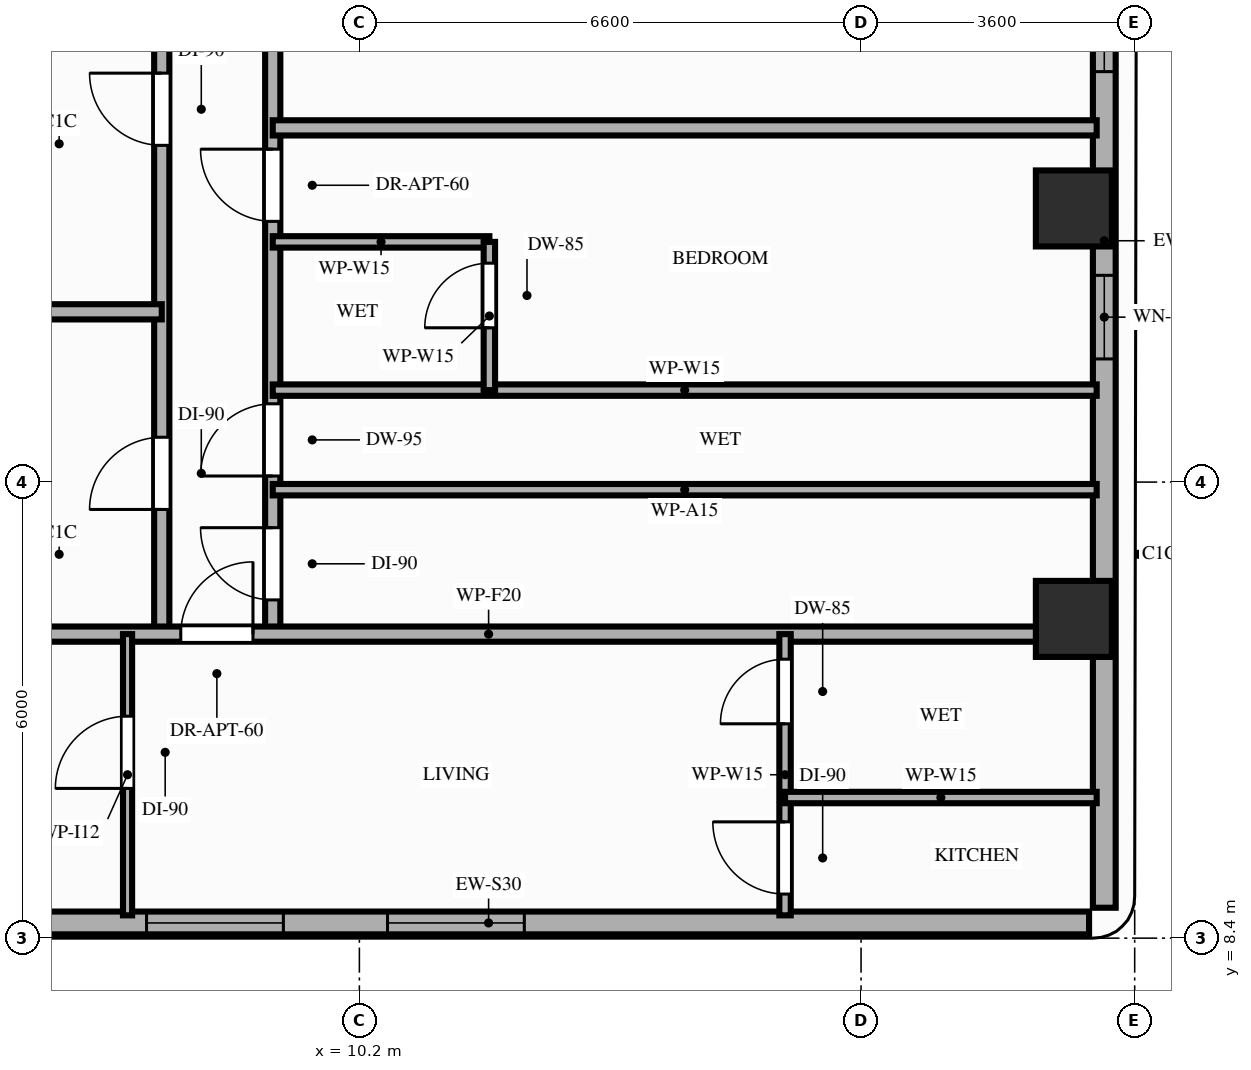
"""IFC4 building model, lengths in metres.
Left out: names, types, materials, properties, quantities, classifications, styles, units other than length and angle.
Written with IfcOpenShell. Run it as: python <this file> out.ifc"""

import sys

from ifc_helpers import new_model, si_unit, direction, frame, frame_2d, origin, origin_2d, place, context, subcontext, project, spatial, rectangle, extrude, element, fill, save


model = new_model("IFC4")
c1 = context("Model", 3, precision=1e-05, world=origin(), true_north=direction((0.0, 1.0)))
c2 = subcontext(c1, "Body", "Model", "MODEL_VIEW")
j1 = project(units=[si_unit("LENGTHUNIT", "METRE"), si_unit("PLANEANGLEUNIT", "RADIAN")], contexts=[c1])
p1 = place(None, origin())
s1 = spatial("IfcSite", under=j1, at=p1, CompositionType="ELEMENT")
p2 = place(p1, origin())
s2 = spatial("IfcBuilding", under=s1, at=p2, CompositionType="ELEMENT")
p3 = place(p2, frame((0.0, 0.0, 126.6)))
s3 = spatial("IfcBuildingStorey", under=s2, at=p3, CompositionType="ELEMENT", Elevation=126.6)
for number, where, z_axis, x_axis in (
    (1, (19.6, 12.6, 0.0), (0.0, 0.0, 1.0), (1.0, 0.0, 0.0)),
    (2, (19.6, 18.0, 0.0), (0.0, 0.0, 1.0), (1.0, 0.0, 0.0)),
):
    element("IfcColumn", number, at=place(p3, frame(where, z_axis=z_axis, x_axis=x_axis)), inside=s3, PredefinedType="COLUMN", context=c2, shape_type="SweptSolid", body=[
        extrude(rectangle(XDim=1.0, YDim=1.0, at=origin_2d()), origin(), (0.0, 0.0, 1.0), 3.2),
    ])
p4 = place(p3, frame((4.0, 8.6, 0.0), z_axis=(0.0, 0.0, 1.0), x_axis=(1.0, 0.0, 0.0)))
e3 = element("IfcWall", 3, at=p4, inside=s3, PredefinedType="STANDARD", context=c2, shape_type="SweptSolid", body=[
    extrude(rectangle(XDim=15.8, YDim=0.3, at=frame_2d((7.9, 0.0))), origin(), (0.0, 0.0, 1.0), 3.02),
])
p5 = place(p4, frame((6.57, 0.0, 0.85)))
e4 = element("IfcOpeningElement", 4, at=p5, cuts=e3, PredefinedType="OPENING", context=c2, shape_type="SweptSolid", body=[
    extrude(rectangle(XDim=1.8, YDim=1.75, at=frame_2d((0.9, 0.875))), frame((0.0, 0.16, 0.0), z_axis=(0.0, -1.0, 0.0), x_axis=(1.0, 0.0, 0.0)), (0.0, 0.0, 1.0), 0.32),
])
p6 = place(p4, frame((3.4, 0.0, 0.85)))
e5 = element("IfcOpeningElement", 5, at=p6, cuts=e3, PredefinedType="OPENING", context=c2, shape_type="SweptSolid", body=[
    extrude(rectangle(XDim=1.8, YDim=1.75, at=frame_2d((0.9, 0.875))), frame((0.0, 0.16, 0.0), z_axis=(0.0, -1.0, 0.0), x_axis=(1.0, 0.0, 0.0)), (0.0, 0.0, 1.0), 0.32),
])
p7 = place(p3, frame((20.0, 8.8, 0.0), z_axis=(0.0, 0.0, 1.0), x_axis=(0.0, 1.0, 0.0)))
e6 = element("IfcWall", 6, at=p7, inside=s3, PredefinedType="STANDARD", context=c2, shape_type="SweptSolid", body=[
    extrude(rectangle(XDim=17.55, YDim=0.3, at=frame_2d((8.775, 0.0))), origin(), (0.0, 0.0, 1.0), 2.45),
])
p8 = place(p7, frame((7.22, 0.0, 0.85)))
e7 = element("IfcOpeningElement", 7, at=p8, cuts=e6, PredefinedType="OPENING", context=c2, shape_type="SweptSolid", body=[
    extrude(rectangle(XDim=1.1, YDim=1.35, at=frame_2d((0.55, 0.675))), frame((0.0, 0.16, 0.0), z_axis=(0.0, -1.0, 0.0), x_axis=(1.0, 0.0, 0.0)), (0.0, 0.0, 1.0), 0.32),
])
p9 = place(p7, frame((11.0, 0.0, 0.85)))
e8 = element("IfcOpeningElement", 8, at=p9, cuts=e6, PredefinedType="OPENING", context=c2, shape_type="SweptSolid", body=[
    extrude(rectangle(XDim=1.8, YDim=1.35, at=frame_2d((0.9, 0.675))), frame((0.0, 0.16, 0.0), z_axis=(0.0, -1.0, 0.0), x_axis=(1.0, 0.0, 0.0)), (0.0, 0.0, 1.0), 0.32),
])
p10 = place(p3, frame((7.6, 12.4, 0.0), z_axis=(0.0, 0.0, 1.0), x_axis=(0.0, 1.0, 0.0)))
e9 = element("IfcWall", 9, at=p10, inside=s3, PredefinedType="PARTITIONING", context=c2, shape_type="SweptSolid", body=[
    extrude(rectangle(XDim=15.7, YDim=0.2, at=frame_2d((7.85, 0.0))), origin(), (0.0, 0.0, 1.0), 2.45),
])
p11 = place(p10, frame((1.64, 0.0, 0.0)))
e10 = element("IfcOpeningElement", 10, at=p11, cuts=e9, PredefinedType="OPENING", context=c2, shape_type="SweptSolid", body=[
    extrude(rectangle(XDim=0.95, YDim=2.15, at=frame_2d((0.475, 1.075))), frame((0.0, 0.11, 0.0), z_axis=(0.0, -1.0, 0.0), x_axis=(1.0, 0.0, 0.0)), (0.0, 0.0, 1.0), 0.22),
])
p12 = place(p10, frame((6.43, 0.0, 0.0)))
e11 = element("IfcOpeningElement", 11, at=p12, cuts=e9, PredefinedType="OPENING", context=c2, shape_type="SweptSolid", body=[
    extrude(rectangle(XDim=0.95, YDim=2.15, at=frame_2d((0.475, 1.075))), frame((0.0, 0.11, 0.0), z_axis=(0.0, -1.0, 0.0), x_axis=(1.0, 0.0, 0.0)), (0.0, 0.0, 1.0), 0.22),
])
p13 = place(p10, frame((12.16, 0.0, 0.0)))
e12 = element("IfcOpeningElement", 12, at=p13, cuts=e9, PredefinedType="OPENING", context=c2, shape_type="SweptSolid", body=[
    extrude(rectangle(XDim=0.95, YDim=2.15, at=frame_2d((0.475, 1.075))), frame((0.0, 0.11, 0.0), z_axis=(0.0, -1.0, 0.0), x_axis=(1.0, 0.0, 0.0)), (0.0, 0.0, 1.0), 0.22),
])
p14 = place(p3, frame((9.06, 12.4, 0.0), z_axis=(0.0, 0.0, 1.0), x_axis=(0.0, 1.0, 0.0)))
e13 = element("IfcWall", 13, at=p14, inside=s3, PredefinedType="PARTITIONING", context=c2, shape_type="SweptSolid", body=[
    extrude(rectangle(XDim=15.7, YDim=0.2, at=frame_2d((7.85, 0.0))), origin(), (0.0, 0.0, 1.0), 2.45),
])
p15 = place(p14, frame((0.45, 0.0, 0.0)))
e14 = element("IfcOpeningElement", 14, at=p15, cuts=e13, PredefinedType="OPENING", context=c2, shape_type="SweptSolid", body=[
    extrude(rectangle(XDim=0.95, YDim=2.15, at=frame_2d((0.475, 1.075))), frame((0.0, 0.11, 0.0), z_axis=(0.0, -1.0, 0.0), x_axis=(1.0, 0.0, 0.0)), (0.0, 0.0, 1.0), 0.22),
])
p16 = place(p14, frame((2.08, 0.0, 0.0)))
e15 = element("IfcOpeningElement", 15, at=p16, cuts=e13, PredefinedType="OPENING", context=c2, shape_type="SweptSolid", body=[
    extrude(rectangle(XDim=0.95, YDim=2.1, at=frame_2d((0.475, 1.05))), frame((0.0, 0.11, 0.0), z_axis=(0.0, -1.0, 0.0), x_axis=(1.0, 0.0, 0.0)), (0.0, 0.0, 1.0), 0.22),
])
p17 = place(p14, frame((10.7, 0.0, 0.0)))
e16 = element("IfcOpeningElement", 16, at=p17, cuts=e13, PredefinedType="OPENING", context=c2, shape_type="SweptSolid", body=[
    extrude(rectangle(XDim=0.95, YDim=2.15, at=frame_2d((0.475, 1.075))), frame((0.0, 0.11, 0.0), z_axis=(0.0, -1.0, 0.0), x_axis=(1.0, 0.0, 0.0)), (0.0, 0.0, 1.0), 0.22),
])
p18 = place(p14, frame((5.43, 0.0, 0.0)))
e17 = element("IfcOpeningElement", 17, at=p18, cuts=e13, PredefinedType="OPENING", context=c2, shape_type="SweptSolid", body=[
    extrude(rectangle(XDim=0.95, YDim=2.15, at=frame_2d((0.475, 1.075))), frame((0.0, 0.11, 0.0), z_axis=(0.0, -1.0, 0.0), x_axis=(1.0, 0.0, 0.0)), (0.0, 0.0, 1.0), 0.22),
])
p19 = place(p3, frame((3.9, 12.4, 0.0), z_axis=(0.0, 0.0, 1.0), x_axis=(1.0, 0.0, 0.0)))
e18 = element("IfcWall", 18, at=p19, inside=s3, PredefinedType="PARTITIONING", context=c2, shape_type="SweptSolid", body=[
    extrude(rectangle(XDim=16.0, YDim=0.2, at=frame_2d((8.0, 0.0))), origin(), (0.0, 0.0, 1.0), 2.45),
])
p20 = place(p19, frame((3.95, 0.0, 0.0)))
e19 = element("IfcOpeningElement", 19, at=p20, cuts=e18, PredefinedType="OPENING", context=c2, shape_type="SweptSolid", body=[
    extrude(rectangle(XDim=0.95, YDim=2.15, at=frame_2d((0.475, 1.075))), frame((0.0, 0.11, 0.0), z_axis=(0.0, -1.0, 0.0), x_axis=(1.0, 0.0, 0.0)), (0.0, 0.0, 1.0), 0.22),
])
p21 = place(p3, frame((3.9, 16.64, 0.0), z_axis=(0.0, 0.0, 1.0), x_axis=(1.0, 0.0, 0.0)))
e20 = element("IfcWall", 20, at=p21, inside=s3, PredefinedType="PARTITIONING", context=c2, shape_type="SweptSolid", body=[
    extrude(rectangle(XDim=3.7, YDim=0.2, at=frame_2d((1.85, 0.0))), origin(), (0.0, 0.0, 1.0), 2.45),
])
p22 = place(p3, frame((7.15, 8.7, 0.0), z_axis=(0.0, 0.0, 1.0), x_axis=(0.0, 1.0, 0.0)))
e21 = element("IfcWall", 21, at=p22, inside=s3, PredefinedType="PARTITIONING", context=c2, shape_type="SweptSolid", body=[
    extrude(rectangle(XDim=3.7, YDim=0.12, at=frame_2d((1.85, 0.0))), origin(), (0.0, 0.0, 1.0), 2.45),
])
p23 = place(p22, frame((1.67, 0.0, 0.0)))
e22 = element("IfcOpeningElement", 22, at=p23, cuts=e21, PredefinedType="OPENING", context=c2, shape_type="SweptSolid", body=[
    extrude(rectangle(XDim=0.95, YDim=2.15, at=frame_2d((0.475, 1.075))), frame((0.0, 0.07, 0.0), z_axis=(0.0, -1.0, 0.0), x_axis=(1.0, 0.0, 0.0)), (0.0, 0.0, 1.0), 0.14),
])
p24 = place(p3, frame((15.8, 8.7, 0.0), z_axis=(0.0, 0.0, 1.0), x_axis=(0.0, 1.0, 0.0)))
e23 = element("IfcWall", 23, at=p24, inside=s3, PredefinedType="PARTITIONING", context=c2, shape_type="SweptSolid", body=[
    extrude(rectangle(XDim=3.7, YDim=0.15, at=frame_2d((1.85, 0.0))), origin(), (0.0, 0.0, 1.0), 2.45),
])
p25 = place(p24, frame((0.28, 0.0, 0.0)))
e24 = element("IfcOpeningElement", 24, at=p25, cuts=e23, PredefinedType="OPENING", context=c2, shape_type="SweptSolid", body=[
    extrude(rectangle(XDim=0.95, YDim=2.15, at=frame_2d((0.475, 1.075))), frame((0.0, 0.085, 0.0), z_axis=(0.0, -1.0, 0.0), x_axis=(1.0, 0.0, 0.0)), (0.0, 0.0, 1.0), 0.17),
])
p26 = place(p24, frame((2.52, 0.0, 0.0)))
e25 = element("IfcOpeningElement", 25, at=p26, cuts=e23, PredefinedType="OPENING", context=c2, shape_type="SweptSolid", body=[
    extrude(rectangle(XDim=0.85, YDim=2.1, at=frame_2d((0.425, 1.05))), frame((0.0, 0.085, 0.0), z_axis=(0.0, -1.0, 0.0), x_axis=(1.0, 0.0, 0.0)), (0.0, 0.0, 1.0), 0.17),
])
p27 = place(p3, frame((15.8, 10.25, 0.0), z_axis=(0.0, 0.0, 1.0), x_axis=(1.0, 0.0, 0.0)))
e26 = element("IfcWall", 26, at=p27, inside=s3, PredefinedType="PARTITIONING", context=c2, shape_type="SweptSolid", body=[
    extrude(rectangle(XDim=4.1, YDim=0.15, at=frame_2d((2.05, 0.0))), origin(), (0.0, 0.0, 1.0), 3.02),
])
for number, where, z_axis, x_axis in (
    (27, (9.06, 14.3, 0.0), (0.0, 0.0, 1.0), (1.0, 0.0, 0.0)),
    (28, (9.06, 15.61, 0.0), (0.0, 0.0, 1.0), (1.0, 0.0, 0.0)),
):
    element("IfcWall", number, at=place(p3, frame(where, z_axis=z_axis, x_axis=x_axis)), inside=s3, PredefinedType="PARTITIONING", context=c2, shape_type="SweptSolid", body=[
        extrude(rectangle(XDim=10.84, YDim=0.15, at=frame_2d((5.42, 0.0))), origin(), (0.0, 0.0, 1.0), 2.45),
    ])
p28 = place(p3, frame((9.06, 19.06, 0.0), z_axis=(0.0, 0.0, 1.0), x_axis=(1.0, 0.0, 0.0)))
e29 = element("IfcWall", 29, at=p28, inside=s3, PredefinedType="PARTITIONING", context=c2, shape_type="SweptSolid", body=[
    extrude(rectangle(XDim=10.84, YDim=0.2, at=frame_2d((5.42, 0.0))), origin(), (0.0, 0.0, 1.0), 2.45),
])
p29 = place(p3, frame((9.06, 17.56, 0.0), z_axis=(0.0, 0.0, 1.0), x_axis=(1.0, 0.0, 0.0)))
e30 = element("IfcWall", 30, at=p29, inside=s3, PredefinedType="PARTITIONING", context=c2, shape_type="SweptSolid", body=[
    extrude(rectangle(XDim=2.85, YDim=0.15, at=frame_2d((1.425, 0.0))), origin(), (0.0, 0.0, 1.0), 3.02),
])
p30 = place(p3, frame((11.91, 15.61, 0.0), z_axis=(0.0, 0.0, 1.0), x_axis=(0.0, 1.0, 0.0)))
e31 = element("IfcWall", 31, at=p30, inside=s3, PredefinedType="PARTITIONING", context=c2, shape_type="SweptSolid", body=[
    extrude(rectangle(XDim=1.95, YDim=0.15, at=frame_2d((0.975, 0.0))), origin(), (0.0, 0.0, 1.0), 2.71),
])
p31 = place(p30, frame((0.82, 0.0, 0.0)))
e32 = element("IfcOpeningElement", 32, at=p31, cuts=e31, PredefinedType="OPENING", context=c2, shape_type="SweptSolid", body=[
    extrude(rectangle(XDim=0.85, YDim=2.1, at=frame_2d((0.425, 1.05))), frame((0.0, 0.085, 0.0), z_axis=(0.0, -1.0, 0.0), x_axis=(1.0, 0.0, 0.0)), (0.0, 0.0, 1.0), 0.17),
])
p32 = place(p5, origin())
e33 = element("IfcWindow", 33, at=p32, inside=s3, PartitioningType="SINGLE_PANEL", PredefinedType="WINDOW", context=c2, shape_type="SweptSolid", body=[
    extrude(rectangle(XDim=1.8, YDim=1.75, at=frame_2d((0.9, 0.875))), frame((0.0, 0.03, 0.0), z_axis=(0.0, -1.0, 0.0), x_axis=(1.0, 0.0, 0.0)), (0.0, 0.0, 1.0), 0.06),
])
fill(e4, e33)
p33 = place(p8, origin())
e34 = element("IfcWindow", 34, at=p33, inside=s3, PartitioningType="SINGLE_PANEL", PredefinedType="WINDOW", context=c2, shape_type="SweptSolid", body=[
    extrude(rectangle(XDim=1.1, YDim=1.35, at=frame_2d((0.55, 0.675))), frame((0.0, 0.03, 0.0), z_axis=(0.0, -1.0, 0.0), x_axis=(1.0, 0.0, 0.0)), (0.0, 0.0, 1.0), 0.06),
])
fill(e7, e34)
p34 = place(p9, origin())
e35 = element("IfcWindow", 35, at=p34, inside=s3, PartitioningType="SINGLE_PANEL", PredefinedType="WINDOW", context=c2, shape_type="SweptSolid", body=[
    extrude(rectangle(XDim=1.8, YDim=1.35, at=frame_2d((0.9, 0.675))), frame((0.0, 0.03, 0.0), z_axis=(0.0, -1.0, 0.0), x_axis=(1.0, 0.0, 0.0)), (0.0, 0.0, 1.0), 0.06),
])
fill(e8, e35)
p35 = place(p6, origin())
e36 = element("IfcWindow", 36, at=p35, inside=s3, PartitioningType="SINGLE_PANEL", PredefinedType="WINDOW", context=c2, shape_type="SweptSolid", body=[
    extrude(rectangle(XDim=1.8, YDim=1.75, at=frame_2d((0.9, 0.875))), frame((0.0, 0.03, 0.0), z_axis=(0.0, -1.0, 0.0), x_axis=(1.0, 0.0, 0.0)), (0.0, 0.0, 1.0), 0.06),
])
fill(e5, e36)
p36 = place(p11, origin())
e37 = element("IfcDoor", 37, at=p36, inside=s3, OperationType="SINGLE_SWING_LEFT", PredefinedType="DOOR", context=c2, shape_type="SweptSolid", body=[
    extrude(rectangle(XDim=0.95, YDim=2.15, at=frame_2d((0.475, 1.075))), frame((0.0, 0.025, 0.0), z_axis=(0.0, -1.0, 0.0), x_axis=(1.0, 0.0, 0.0)), (0.0, 0.0, 1.0), 0.05),
])
fill(e10, e37)
p37 = place(p12, origin())
e38 = element("IfcDoor", 38, at=p37, inside=s3, OperationType="SINGLE_SWING_RIGHT", PredefinedType="DOOR", context=c2, shape_type="SweptSolid", body=[
    extrude(rectangle(XDim=0.95, YDim=2.15, at=frame_2d((0.475, 1.075))), frame((0.0, 0.025, 0.0), z_axis=(0.0, -1.0, 0.0), x_axis=(1.0, 0.0, 0.0)), (0.0, 0.0, 1.0), 0.05),
])
fill(e11, e38)
p38 = place(p20, origin())
e39 = element("IfcDoor", 39, at=p38, inside=s3, OperationType="SINGLE_SWING_RIGHT", PredefinedType="DOOR", context=c2, shape_type="SweptSolid", body=[
    extrude(rectangle(XDim=0.95, YDim=2.15, at=frame_2d((0.475, 1.075))), frame((0.0, 0.025, 0.0), z_axis=(0.0, -1.0, 0.0), x_axis=(1.0, 0.0, 0.0)), (0.0, 0.0, 1.0), 0.05),
])
fill(e19, e39)
p39 = place(p23, origin())
e40 = element("IfcDoor", 40, at=p39, inside=s3, OperationType="SINGLE_SWING_LEFT", PredefinedType="DOOR", context=c2, shape_type="SweptSolid", body=[
    extrude(rectangle(XDim=0.95, YDim=2.15, at=frame_2d((0.475, 1.075))), frame((0.0, 0.025, 0.0), z_axis=(0.0, -1.0, 0.0), x_axis=(1.0, 0.0, 0.0)), (0.0, 0.0, 1.0), 0.05),
])
fill(e22, e40)
p40 = place(p25, origin())
e41 = element("IfcDoor", 41, at=p40, inside=s3, OperationType="SINGLE_SWING_RIGHT", PredefinedType="DOOR", context=c2, shape_type="SweptSolid", body=[
    extrude(rectangle(XDim=0.95, YDim=2.15, at=frame_2d((0.475, 1.075))), frame((0.0, 0.025, 0.0), z_axis=(0.0, -1.0, 0.0), x_axis=(1.0, 0.0, 0.0)), (0.0, 0.0, 1.0), 0.05),
])
fill(e24, e41)
p41 = place(p26, origin())
e42 = element("IfcDoor", 42, at=p41, inside=s3, OperationType="SINGLE_SWING_LEFT", PredefinedType="DOOR", context=c2, shape_type="SweptSolid", body=[
    extrude(rectangle(XDim=0.85, YDim=2.1, at=frame_2d((0.425, 1.05))), frame((0.0, 0.025, 0.0), z_axis=(0.0, -1.0, 0.0), x_axis=(1.0, 0.0, 0.0)), (0.0, 0.0, 1.0), 0.05),
])
fill(e25, e42)
p42 = place(p15, origin())
e43 = element("IfcDoor", 43, at=p42, inside=s3, OperationType="SINGLE_SWING_RIGHT", PredefinedType="DOOR", context=c2, shape_type="SweptSolid", body=[
    extrude(rectangle(XDim=0.95, YDim=2.15, at=frame_2d((0.475, 1.075))), frame((0.0, 0.025, 0.0), z_axis=(0.0, -1.0, 0.0), x_axis=(1.0, 0.0, 0.0)), (0.0, 0.0, 1.0), 0.05),
])
fill(e14, e43)
p43 = place(p16, origin())
e44 = element("IfcDoor", 44, at=p43, inside=s3, OperationType="SINGLE_SWING_LEFT", PredefinedType="DOOR", context=c2, shape_type="SweptSolid", body=[
    extrude(rectangle(XDim=0.95, YDim=2.1, at=frame_2d((0.475, 1.05))), frame((0.0, 0.025, 0.0), z_axis=(0.0, -1.0, 0.0), x_axis=(1.0, 0.0, 0.0)), (0.0, 0.0, 1.0), 0.05),
])
fill(e15, e44)
p44 = place(p31, origin())
e45 = element("IfcDoor", 45, at=p44, inside=s3, OperationType="SINGLE_SWING_LEFT", PredefinedType="DOOR", context=c2, shape_type="SweptSolid", body=[
    extrude(rectangle(XDim=0.85, YDim=2.1, at=frame_2d((0.425, 1.05))), frame((0.0, 0.025, 0.0), z_axis=(0.0, -1.0, 0.0), x_axis=(1.0, 0.0, 0.0)), (0.0, 0.0, 1.0), 0.05),
])
fill(e32, e45)
p45 = place(p18, origin())
e46 = element("IfcDoor", 46, at=p45, inside=s3, OperationType="SINGLE_SWING_RIGHT", PredefinedType="DOOR", context=c2, shape_type="SweptSolid", body=[
    extrude(rectangle(XDim=0.95, YDim=2.15, at=frame_2d((0.475, 1.075))), frame((0.0, 0.025, 0.0), z_axis=(0.0, -1.0, 0.0), x_axis=(1.0, 0.0, 0.0)), (0.0, 0.0, 1.0), 0.05),
])
fill(e17, e46)
save(model, sys.argv[1])
